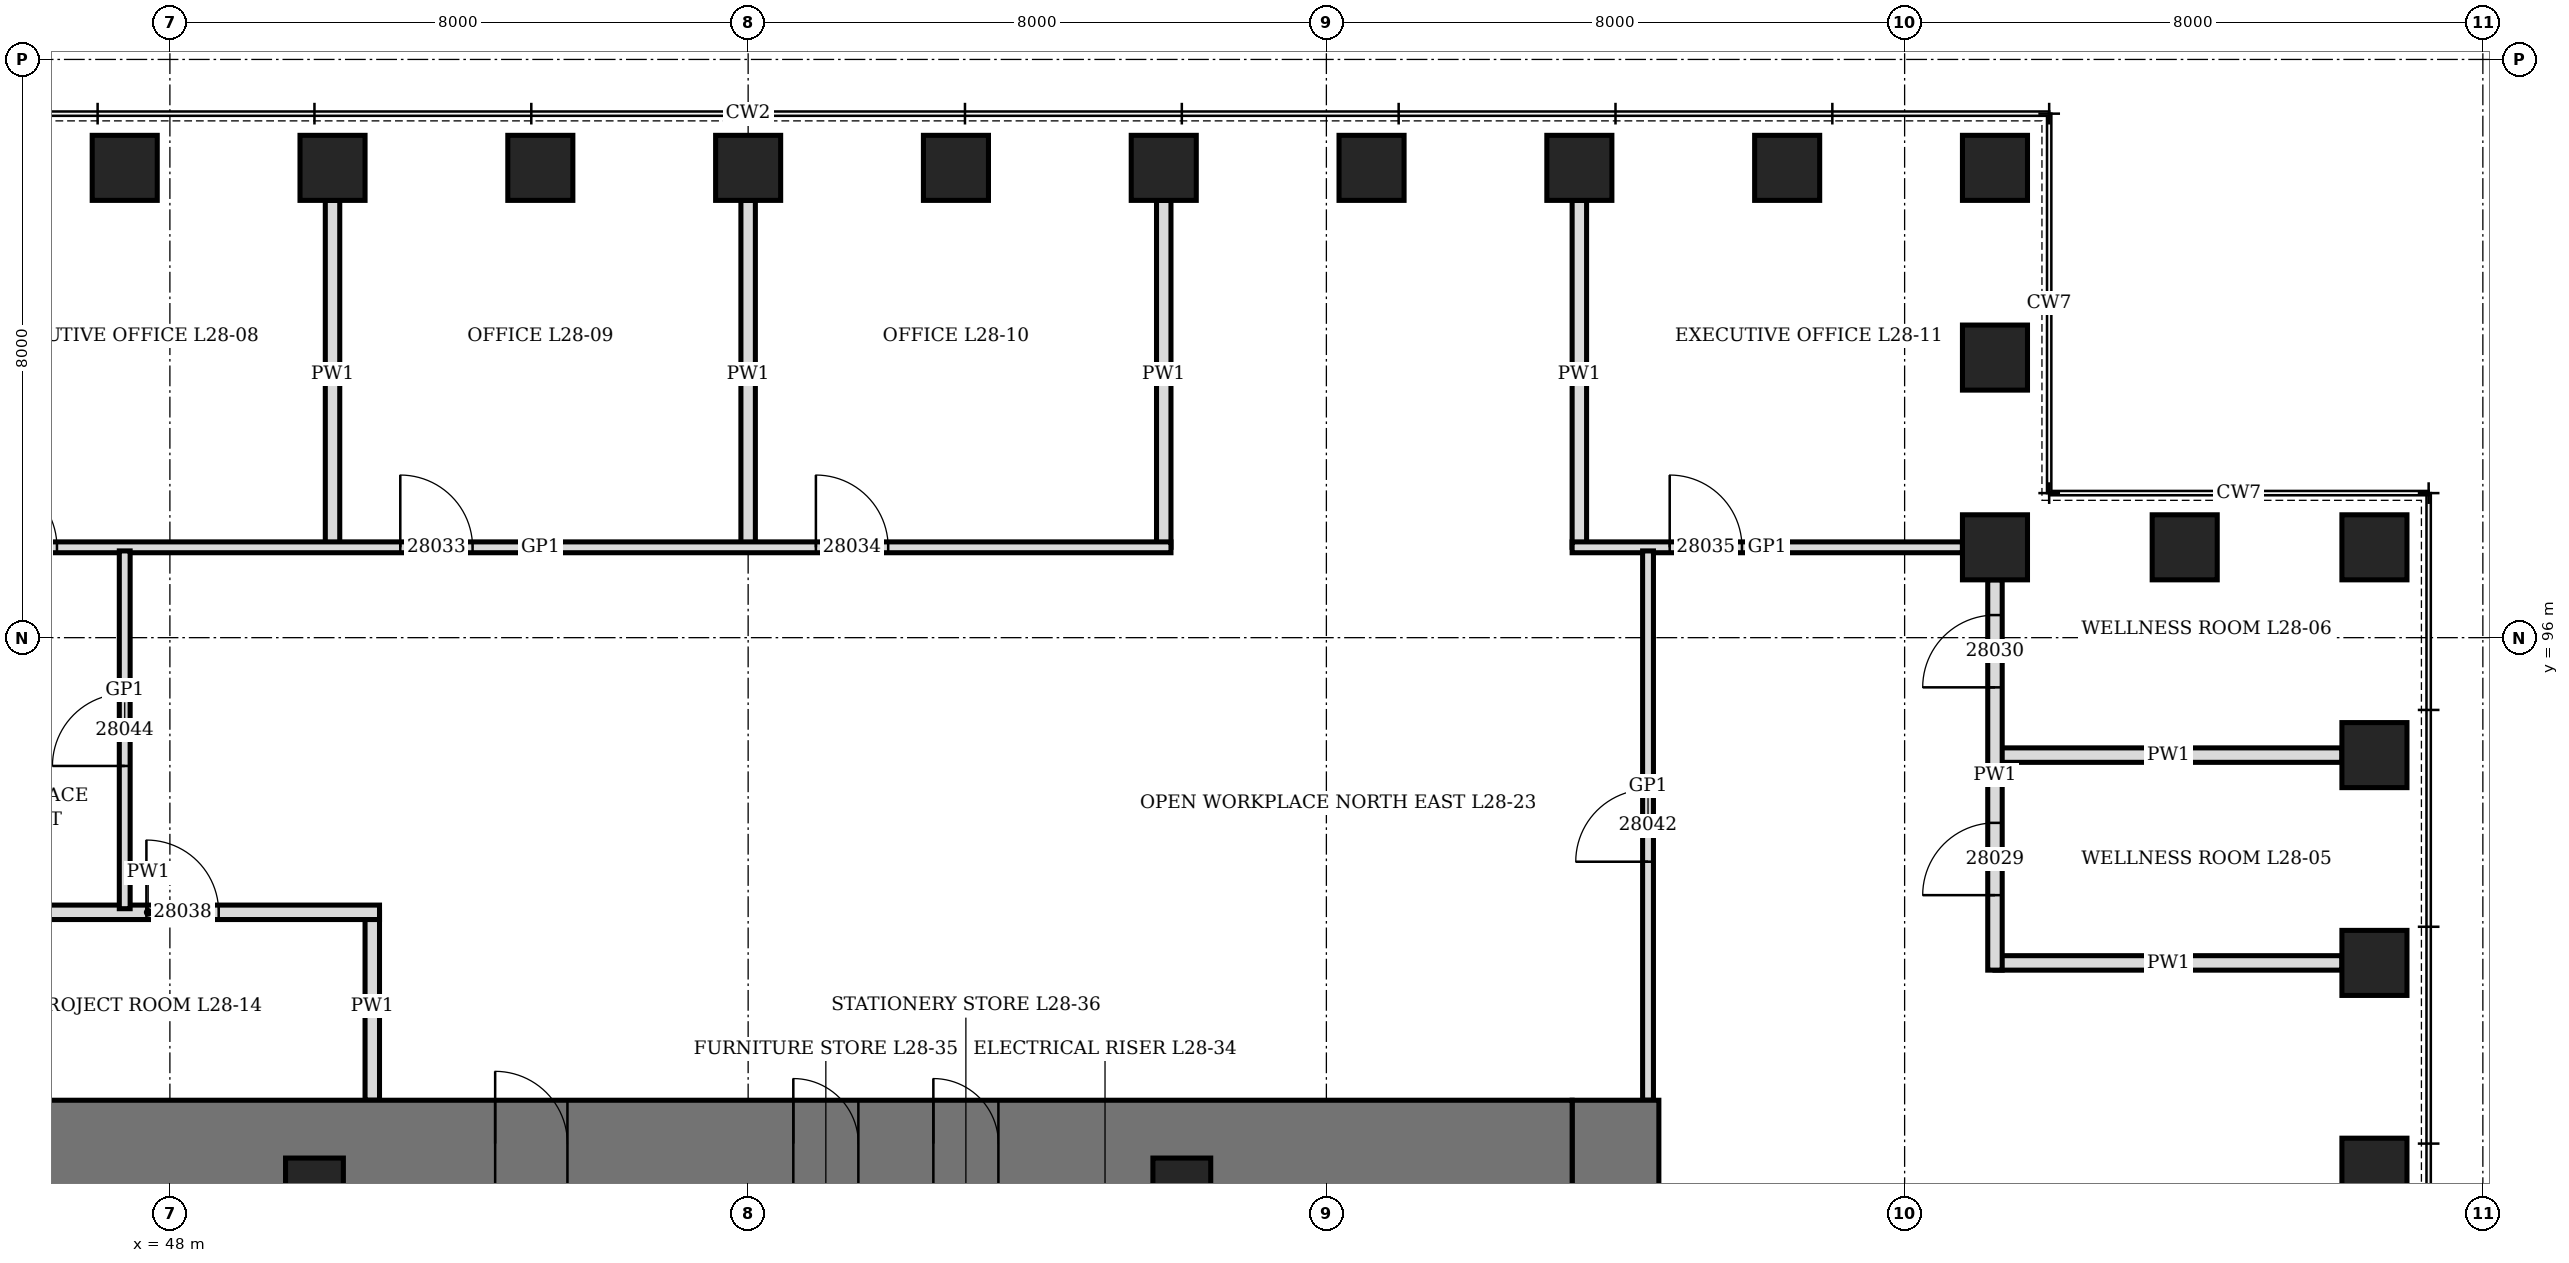
"""IFC4 building model, lengths in metres.
Left out: names, types, materials, properties, quantities, classifications, styles, units other than length and angle.
Written with IfcOpenShell. Run it as: python <this file> out.ifc"""

import sys

from ifc_helpers import new_model, si_unit, direction, frame, frame_2d, origin, origin_2d, place, context, subcontext, project, spatial, rectangle, hollow_rectangle, extrude, element, fill, save


model = new_model("IFC4")
c1 = context("Model", 3, precision=1e-05, world=origin(), true_north=direction((0.0, 1.0)))
c2 = subcontext(c1, "Body", "Model", "MODEL_VIEW")
j1 = project(units=[si_unit("LENGTHUNIT", "METRE"), si_unit("PLANEANGLEUNIT", "RADIAN")], contexts=[c1])
p1 = place(None, origin())
s1 = spatial("IfcSite", under=j1, at=p1, CompositionType="ELEMENT")
p2 = place(p1, origin())
s2 = spatial("IfcBuilding", under=s1, at=p2, CompositionType="ELEMENT")
p3 = place(p2, frame((0.0, 0.0, 129.1)))
s3 = spatial("IfcBuildingStorey", under=s2, at=p3, CompositionType="ELEMENT", Elevation=129.1)
for number, where, z_axis, x_axis in (
    (1, (78.5, 88.625, 0.0), (0.0, 0.0, 1.0), (0.0, 1.0, 0.0)),
    (2, (78.5, 91.5, 0.0), (0.0, 0.0, 1.0), (0.0, 1.0, 0.0)),
    (3, (78.5, 94.375, 0.0), (0.0, 0.0, 1.0), (0.0, 1.0, 0.0)),
    (4, (78.5, 97.25, 0.0), (0.0, 0.0, 1.0), (1.0, 0.0, 0.0)),
    (5, (75.875, 97.25, 0.0), (0.0, 0.0, 1.0), (1.0, 0.0, 0.0)),
    (6, (73.25, 97.25, 0.0), (0.0, 0.0, 1.0), (0.0, 1.0, 0.0)),
    (7, (73.25, 99.875, 0.0), (0.0, 0.0, 1.0), (0.0, 1.0, 0.0)),
    (8, (73.25, 102.5, 0.0), (0.0, 0.0, 1.0), (1.0, 0.0, 0.0)),
    (9, (70.375, 102.5, 0.0), (0.0, 0.0, 1.0), (1.0, 0.0, 0.0)),
    (10, (67.5, 102.5, 0.0), (0.0, 0.0, 1.0), (1.0, 0.0, 0.0)),
    (11, (64.625, 102.5, 0.0), (0.0, 0.0, 1.0), (1.0, 0.0, 0.0)),
    (12, (61.75, 102.5, 0.0), (0.0, 0.0, 1.0), (1.0, 0.0, 0.0)),
    (13, (58.875, 102.5, 0.0), (0.0, 0.0, 1.0), (1.0, 0.0, 0.0)),
    (14, (56.0, 102.5, 0.0), (0.0, 0.0, 1.0), (1.0, 0.0, 0.0)),
    (15, (53.125, 102.5, 0.0), (0.0, 0.0, 1.0), (1.0, 0.0, 0.0)),
    (16, (50.25, 102.5, 0.0), (0.0, 0.0, 1.0), (1.0, 0.0, 0.0)),
    (17, (47.375, 102.5, 0.0), (0.0, 0.0, 1.0), (1.0, 0.0, 0.0)),
):
    element("IfcColumn", number, at=place(p3, frame(where, z_axis=z_axis, x_axis=x_axis)), inside=s3, PredefinedType="COLUMN", context=c2, shape_type="SweptSolid", body=[
        extrude(hollow_rectangle(XDim=0.9, YDim=0.9, WallThickness=0.15, at=origin_2d()), origin(), (0.0, 0.0, 1.0), 4.2),
    ])
p4 = place(p3, frame((68.0, 70.4, 0.0), z_axis=(0.0, 0.0, 1.0), x_axis=(0.0, 1.0, 0.0)))
e18 = element("IfcWall", 18, at=p4, inside=s3, PredefinedType="SHEAR", context=c2, shape_type="SweptSolid", body=[
    extrude(rectangle(XDim=19.2, YDim=1.2, at=frame_2d((9.6, 0.0))), origin(), (0.0, 0.0, 1.0), 4.2),
])
p5 = place(p4, frame((8.6, 0.0, 0.0)))
e19 = element("IfcOpeningElement", 19, at=p5, cuts=e18, PredefinedType="OPENING", context=c2, shape_type="SweptSolid", body=[
    extrude(rectangle(XDim=2.0, YDim=2.4, at=frame_2d((1.0, 1.2))), frame((0.0, 0.61, 0.0), z_axis=(0.0, -1.0, 0.0), x_axis=(1.0, 0.0, 0.0)), (0.0, 0.0, 1.0), 1.22),
])
p6 = place(p3, frame((44.6, 89.0, 0.0), z_axis=(0.0, 0.0, 1.0), x_axis=(1.0, 0.0, 0.0)))
e20 = element("IfcWall", 20, at=p6, inside=s3, PredefinedType="SHEAR", context=c2, shape_type="SweptSolid", body=[
    extrude(rectangle(XDim=22.8, YDim=1.2, at=frame_2d((11.4, 0.0))), origin(), (0.0, 0.0, 1.0), 4.2),
])
p7 = place(p6, frame((7.9, 0.0, 0.0)))
e21 = element("IfcOpeningElement", 21, at=p7, cuts=e20, PredefinedType="OPENING", context=c2, shape_type="SweptSolid", body=[
    extrude(rectangle(XDim=1.0, YDim=2.1, at=frame_2d((0.5, 1.05))), frame((0.0, 0.61, 0.0), z_axis=(0.0, -1.0, 0.0), x_axis=(1.0, 0.0, 0.0)), (0.0, 0.0, 1.0), 1.22),
])
p8 = place(p6, frame((12.025, 0.0, 0.0)))
e22 = element("IfcOpeningElement", 22, at=p8, cuts=e20, PredefinedType="OPENING", context=c2, shape_type="SweptSolid", body=[
    extrude(rectangle(XDim=0.9, YDim=2.1, at=frame_2d((0.45, 1.05))), frame((0.0, 0.61, 0.0), z_axis=(0.0, -1.0, 0.0), x_axis=(1.0, 0.0, 0.0)), (0.0, 0.0, 1.0), 1.22),
])
p9 = place(p6, frame((13.962, 0.0, 0.0)))
e23 = element("IfcOpeningElement", 23, at=p9, cuts=e20, PredefinedType="OPENING", context=c2, shape_type="SweptSolid", body=[
    extrude(rectangle(XDim=0.9, YDim=2.1, at=frame_2d((0.45, 1.05))), frame((0.0, 0.61, 0.0), z_axis=(0.0, -1.0, 0.0), x_axis=(1.0, 0.0, 0.0)), (0.0, 0.0, 1.0), 1.22),
])
for number, where, z_axis, x_axis in (
    (24, (50.0, 88.4, 0.0), (0.0, 0.0, 1.0), (1.0, 0.0, 0.0)),
    (25, (62.0, 88.4, 0.0), (0.0, 0.0, 1.0), (1.0, 0.0, 0.0)),
):
    element("IfcColumn", number, at=place(p3, frame(where, z_axis=z_axis, x_axis=x_axis)), inside=s3, PredefinedType="COLUMN", context=c2, shape_type="SweptSolid", body=[
        extrude(hollow_rectangle(XDim=0.8, YDim=0.8, WallThickness=0.1, at=origin_2d()), origin(), (0.0, 0.0, 1.0), 4.2),
    ])
for number, where, z_axis, x_axis in (
    (26, (73.25, 91.5, 0.0), (0.0, 0.0, 1.0), (1.0, 0.0, 0.0)),
    (27, (73.25, 94.375, 0.0), (0.0, 0.0, 1.0), (1.0, 0.0, 0.0)),
):
    element("IfcWall", number, at=place(p3, frame(where, z_axis=z_axis, x_axis=x_axis)), inside=s3, PredefinedType="PARTITIONING", context=c2, shape_type="SweptSolid", body=[
        extrude(rectangle(XDim=4.8, YDim=0.2, at=frame_2d((2.4, 0.0))), origin(), (0.0, 0.0, 1.0), 3.428),
    ])
for number, where, z_axis, x_axis in (
    (28, (50.25, 97.25, 0.0), (0.0, 0.0, 1.0), (0.0, 1.0, 0.0)),
    (29, (56.0, 97.25, 0.0), (0.0, 0.0, 1.0), (0.0, 1.0, 0.0)),
    (30, (61.75, 97.25, 0.0), (0.0, 0.0, 1.0), (0.0, 1.0, 0.0)),
):
    element("IfcWall", number, at=place(p3, frame(where, z_axis=z_axis, x_axis=x_axis)), inside=s3, PredefinedType="PARTITIONING", context=c2, shape_type="SweptSolid", body=[
        extrude(rectangle(XDim=4.8, YDim=0.2, at=frame_2d((2.4, 0.0))), origin(), (0.0, 0.0, 1.0), 3.278),
    ])
p10 = place(p3, frame((67.5, 97.25, 0.0), z_axis=(0.0, 0.0, 1.0), x_axis=(0.0, 1.0, 0.0)))
e31 = element("IfcWall", 31, at=p10, inside=s3, PredefinedType="PARTITIONING", context=c2, shape_type="SweptSolid", body=[
    extrude(rectangle(XDim=4.8, YDim=0.2, at=frame_2d((2.4, 0.0))), origin(), (0.0, 0.0, 1.0), 2.74),
])
p11 = place(p3, frame((50.8, 89.6, 0.0), z_axis=(0.0, 0.0, 1.0), x_axis=(0.0, 1.0, 0.0)))
e32 = element("IfcWall", 32, at=p11, inside=s3, PredefinedType="PARTITIONING", context=c2, shape_type="SweptSolid", body=[
    extrude(rectangle(XDim=2.6, YDim=0.2, at=frame_2d((1.3, 0.0))), origin(), (0.0, 0.0, 1.0), 4.04),
])
p12 = place(p3, frame((44.5, 92.2, 0.0), z_axis=(0.0, 0.0, 1.0), x_axis=(1.0, 0.0, 0.0)))
e33 = element("IfcWall", 33, at=p12, inside=s3, PredefinedType="PARTITIONING", context=c2, shape_type="SweptSolid", body=[
    extrude(rectangle(XDim=6.4, YDim=0.2, at=frame_2d((3.2, 0.0))), origin(), (0.0, 0.0, 1.0), 4.04),
])
p13 = place(p12, frame((3.175, 0.0, 0.0)))
e34 = element("IfcOpeningElement", 34, at=p13, cuts=e33, PredefinedType="OPENING", context=c2, shape_type="SweptSolid", body=[
    extrude(rectangle(XDim=1.0, YDim=2.1, at=frame_2d((0.5, 1.05))), frame((0.0, 0.11, 0.0), z_axis=(0.0, -1.0, 0.0), x_axis=(1.0, 0.0, 0.0)), (0.0, 0.0, 1.0), 0.22),
])
p14 = place(p3, frame((44.4, 97.25, 0.0), z_axis=(0.0, 0.0, 1.0), x_axis=(1.0, 0.0, 0.0)))
e35 = element("IfcWall", 35, at=p14, inside=s3, PredefinedType="PARTITIONING", context=c2, shape_type="SweptSolid", body=[
    extrude(rectangle(XDim=17.45, YDim=0.15, at=frame_2d((8.725, 0.0))), origin(), (0.0, 0.0, 1.0), 4.04),
])
p15 = place(p14, frame((1.038, 0.0, 0.0)))
e36 = element("IfcOpeningElement", 36, at=p15, cuts=e35, PredefinedType="OPENING", context=c2, shape_type="SweptSolid", body=[
    extrude(rectangle(XDim=1.0, YDim=2.1, at=frame_2d((0.5, 1.05))), frame((0.0, 0.085, 0.0), z_axis=(0.0, -1.0, 0.0), x_axis=(1.0, 0.0, 0.0)), (0.0, 0.0, 1.0), 0.17),
])
p16 = place(p14, frame((6.788, 0.0, 0.0)))
e37 = element("IfcOpeningElement", 37, at=p16, cuts=e35, PredefinedType="OPENING", context=c2, shape_type="SweptSolid", body=[
    extrude(rectangle(XDim=1.0, YDim=2.1, at=frame_2d((0.5, 1.05))), frame((0.0, 0.085, 0.0), z_axis=(0.0, -1.0, 0.0), x_axis=(1.0, 0.0, 0.0)), (0.0, 0.0, 1.0), 0.17),
])
p17 = place(p14, frame((12.538, 0.0, 0.0)))
e38 = element("IfcOpeningElement", 38, at=p17, cuts=e35, PredefinedType="OPENING", context=c2, shape_type="SweptSolid", body=[
    extrude(rectangle(XDim=1.0, YDim=2.1, at=frame_2d((0.5, 1.05))), frame((0.0, 0.085, 0.0), z_axis=(0.0, -1.0, 0.0), x_axis=(1.0, 0.0, 0.0)), (0.0, 0.0, 1.0), 0.17),
])
p18 = place(p3, frame((67.4, 97.25, 0.0), z_axis=(0.0, 0.0, 1.0), x_axis=(1.0, 0.0, 0.0)))
e39 = element("IfcWall", 39, at=p18, inside=s3, PredefinedType="PARTITIONING", context=c2, shape_type="SweptSolid", body=[
    extrude(rectangle(XDim=5.4, YDim=0.15, at=frame_2d((2.7, 0.0))), origin(), (0.0, 0.0, 1.0), 4.04),
])
p19 = place(p18, frame((1.35, 0.0, 0.0)))
e40 = element("IfcOpeningElement", 40, at=p19, cuts=e39, PredefinedType="OPENING", context=c2, shape_type="SweptSolid", body=[
    extrude(rectangle(XDim=1.0, YDim=2.1, at=frame_2d((0.5, 1.05))), frame((0.0, 0.085, 0.0), z_axis=(0.0, -1.0, 0.0), x_axis=(1.0, 0.0, 0.0)), (0.0, 0.0, 1.0), 0.17),
])
p20 = place(p3, frame((47.375, 92.25, 0.0), z_axis=(0.0, 0.0, 1.0), x_axis=(0.0, 1.0, 0.0)))
e41 = element("IfcWall", 41, at=p20, inside=s3, PredefinedType="PARTITIONING", context=c2, shape_type="SweptSolid", body=[
    extrude(rectangle(XDim=4.95, YDim=0.15, at=frame_2d((2.475, 0.0))), origin(), (0.0, 0.0, 1.0), 3.278),
])
p21 = place(p20, frame((1.975, 0.0, 0.0)))
e42 = element("IfcOpeningElement", 42, at=p21, cuts=e41, PredefinedType="OPENING", context=c2, shape_type="SweptSolid", body=[
    extrude(rectangle(XDim=1.0, YDim=2.4, at=frame_2d((0.5, 1.2))), frame((0.0, 0.085, 0.0), z_axis=(0.0, -1.0, 0.0), x_axis=(1.0, 0.0, 0.0)), (0.0, 0.0, 1.0), 0.17),
])
p22 = place(p3, frame((68.45, 89.6, 0.0), z_axis=(0.0, 0.0, 1.0), x_axis=(0.0, 1.0, 0.0)))
e43 = element("IfcWall", 43, at=p22, inside=s3, PredefinedType="PARTITIONING", context=c2, shape_type="SweptSolid", body=[
    extrude(rectangle(XDim=7.6, YDim=0.15, at=frame_2d((3.8, 0.0))), origin(), (0.0, 0.0, 1.0), 4.04),
])
p23 = place(p22, frame((3.3, 0.0, 0.0)))
e44 = element("IfcOpeningElement", 44, at=p23, cuts=e43, PredefinedType="OPENING", context=c2, shape_type="SweptSolid", body=[
    extrude(rectangle(XDim=1.0, YDim=2.4, at=frame_2d((0.5, 1.2))), frame((0.0, 0.085, 0.0), z_axis=(0.0, -1.0, 0.0), x_axis=(1.0, 0.0, 0.0)), (0.0, 0.0, 1.0), 0.17),
])
p24 = place(p3, frame((73.25, 91.4, 0.0), z_axis=(0.0, 0.0, 1.0), x_axis=(0.0, 1.0, 0.0)))
e45 = element("IfcWall", 45, at=p24, inside=s3, PredefinedType="PARTITIONING", context=c2, shape_type="SweptSolid", body=[
    extrude(rectangle(XDim=5.4, YDim=0.2, at=frame_2d((2.7, 0.0))), origin(), (0.0, 0.0, 1.0), 4.04),
])
p25 = place(p24, frame((1.038, 0.0, 0.0)))
e46 = element("IfcOpeningElement", 46, at=p25, cuts=e45, PredefinedType="OPENING", context=c2, shape_type="SweptSolid", body=[
    extrude(rectangle(XDim=1.0, YDim=2.1, at=frame_2d((0.5, 1.05))), frame((0.0, 0.11, 0.0), z_axis=(0.0, -1.0, 0.0), x_axis=(1.0, 0.0, 0.0)), (0.0, 0.0, 1.0), 0.22),
])
p26 = place(p24, frame((3.913, 0.0, 0.0)))
e47 = element("IfcOpeningElement", 47, at=p26, cuts=e45, PredefinedType="OPENING", context=c2, shape_type="SweptSolid", body=[
    extrude(rectangle(XDim=1.0, YDim=2.1, at=frame_2d((0.5, 1.05))), frame((0.0, 0.11, 0.0), z_axis=(0.0, -1.0, 0.0), x_axis=(1.0, 0.0, 0.0)), (0.0, 0.0, 1.0), 0.22),
])
p27 = place(p7, origin())
e48 = element("IfcDoor", 48, at=p27, inside=s3, OperationType="SINGLE_SWING_LEFT", PredefinedType="DOOR", context=c2, shape_type="SweptSolid", body=[
    extrude(rectangle(XDim=1.0, YDim=2.1, at=frame_2d((0.5, 1.05))), frame((0.0, 0.35, 0.0), z_axis=(0.0, -1.0, 0.0), x_axis=(1.0, 0.0, 0.0)), (0.0, 0.0, 1.0), 0.7),
])
fill(e21, e48)
p28 = place(p8, origin())
e49 = element("IfcDoor", 49, at=p28, inside=s3, OperationType="SINGLE_SWING_LEFT", PredefinedType="DOOR", context=c2, shape_type="SweptSolid", body=[
    extrude(rectangle(XDim=0.9, YDim=2.1, at=frame_2d((0.45, 1.05))), frame((0.0, 0.35, 0.0), z_axis=(0.0, -1.0, 0.0), x_axis=(1.0, 0.0, 0.0)), (0.0, 0.0, 1.0), 0.7),
])
fill(e22, e49)
p29 = place(p9, origin())
e50 = element("IfcDoor", 50, at=p29, inside=s3, OperationType="SINGLE_SWING_LEFT", PredefinedType="DOOR", context=c2, shape_type="SweptSolid", body=[
    extrude(rectangle(XDim=0.9, YDim=2.1, at=frame_2d((0.45, 1.05))), frame((0.0, 0.35, 0.0), z_axis=(0.0, -1.0, 0.0), x_axis=(1.0, 0.0, 0.0)), (0.0, 0.0, 1.0), 0.7),
])
fill(e23, e50)
p30 = place(p25, origin())
e51 = element("IfcDoor", 51, at=p30, inside=s3, OperationType="SINGLE_SWING_LEFT", PredefinedType="DOOR", context=c2, shape_type="SweptSolid", body=[
    extrude(rectangle(XDim=1.0, YDim=2.1, at=frame_2d((0.5, 1.05))), frame((0.0, 0.1, 0.0), z_axis=(0.0, -1.0, 0.0), x_axis=(1.0, 0.0, 0.0)), (0.0, 0.0, 1.0), 0.199),
])
fill(e46, e51)
p31 = place(p26, origin())
e52 = element("IfcDoor", 52, at=p31, inside=s3, OperationType="SINGLE_SWING_LEFT", PredefinedType="DOOR", context=c2, shape_type="SweptSolid", body=[
    extrude(rectangle(XDim=1.0, YDim=2.1, at=frame_2d((0.5, 1.05))), frame((0.0, 0.1, 0.0), z_axis=(0.0, -1.0, 0.0), x_axis=(1.0, 0.0, 0.0)), (0.0, 0.0, 1.0), 0.199),
])
fill(e47, e52)
p32 = place(p15, origin())
e53 = element("IfcDoor", 53, at=p32, inside=s3, OperationType="SINGLE_SWING_LEFT", PredefinedType="DOOR", context=c2, shape_type="SweptSolid", body=[
    extrude(rectangle(XDim=1.0, YDim=2.1, at=frame_2d((0.5, 1.05))), frame((0.0, 0.075, 0.0), z_axis=(0.0, -1.0, 0.0), x_axis=(1.0, 0.0, 0.0)), (0.0, 0.0, 1.0), 0.149),
])
fill(e36, e53)
p33 = place(p16, origin())
e54 = element("IfcDoor", 54, at=p33, inside=s3, OperationType="SINGLE_SWING_LEFT", PredefinedType="DOOR", context=c2, shape_type="SweptSolid", body=[
    extrude(rectangle(XDim=1.0, YDim=2.1, at=frame_2d((0.5, 1.05))), frame((0.0, 0.075, 0.0), z_axis=(0.0, -1.0, 0.0), x_axis=(1.0, 0.0, 0.0)), (0.0, 0.0, 1.0), 0.149),
])
fill(e37, e54)
p34 = place(p17, origin())
e55 = element("IfcDoor", 55, at=p34, inside=s3, OperationType="SINGLE_SWING_LEFT", PredefinedType="DOOR", context=c2, shape_type="SweptSolid", body=[
    extrude(rectangle(XDim=1.0, YDim=2.1, at=frame_2d((0.5, 1.05))), frame((0.0, 0.075, 0.0), z_axis=(0.0, -1.0, 0.0), x_axis=(1.0, 0.0, 0.0)), (0.0, 0.0, 1.0), 0.149),
])
fill(e38, e55)
p35 = place(p19, origin())
e56 = element("IfcDoor", 56, at=p35, inside=s3, OperationType="SINGLE_SWING_LEFT", PredefinedType="DOOR", context=c2, shape_type="SweptSolid", body=[
    extrude(rectangle(XDim=1.0, YDim=2.1, at=frame_2d((0.5, 1.05))), frame((0.0, 0.075, 0.0), z_axis=(0.0, -1.0, 0.0), x_axis=(1.0, 0.0, 0.0)), (0.0, 0.0, 1.0), 0.149),
])
fill(e40, e56)
p36 = place(p13, origin())
e57 = element("IfcDoor", 57, at=p36, inside=s3, OperationType="SINGLE_SWING_LEFT", PredefinedType="DOOR", context=c2, shape_type="SweptSolid", body=[
    extrude(rectangle(XDim=1.0, YDim=2.1, at=frame_2d((0.5, 1.05))), frame((0.0, 0.1, 0.0), z_axis=(0.0, -1.0, 0.0), x_axis=(1.0, 0.0, 0.0)), (0.0, 0.0, 1.0), 0.199),
])
fill(e34, e57)
p37 = place(p23, origin())
e58 = element("IfcDoor", 58, at=p37, inside=s3, OperationType="SINGLE_SWING_RIGHT", PredefinedType="DOOR", context=c2, shape_type="SweptSolid", body=[
    extrude(rectangle(XDim=1.0, YDim=2.4, at=frame_2d((0.5, 1.2))), frame((0.0, 0.075, 0.0), z_axis=(0.0, -1.0, 0.0), x_axis=(1.0, 0.0, 0.0)), (0.0, 0.0, 1.0), 0.149),
])
fill(e44, e58)
p38 = place(p21, origin())
e59 = element("IfcDoor", 59, at=p38, inside=s3, OperationType="SINGLE_SWING_RIGHT", PredefinedType="DOOR", context=c2, shape_type="SweptSolid", body=[
    extrude(rectangle(XDim=1.0, YDim=2.4, at=frame_2d((0.5, 1.2))), frame((0.0, 0.075, 0.0), z_axis=(0.0, -1.0, 0.0), x_axis=(1.0, 0.0, 0.0)), (0.0, 0.0, 1.0), 0.149),
])
fill(e42, e59)
save(model, sys.argv[1])
